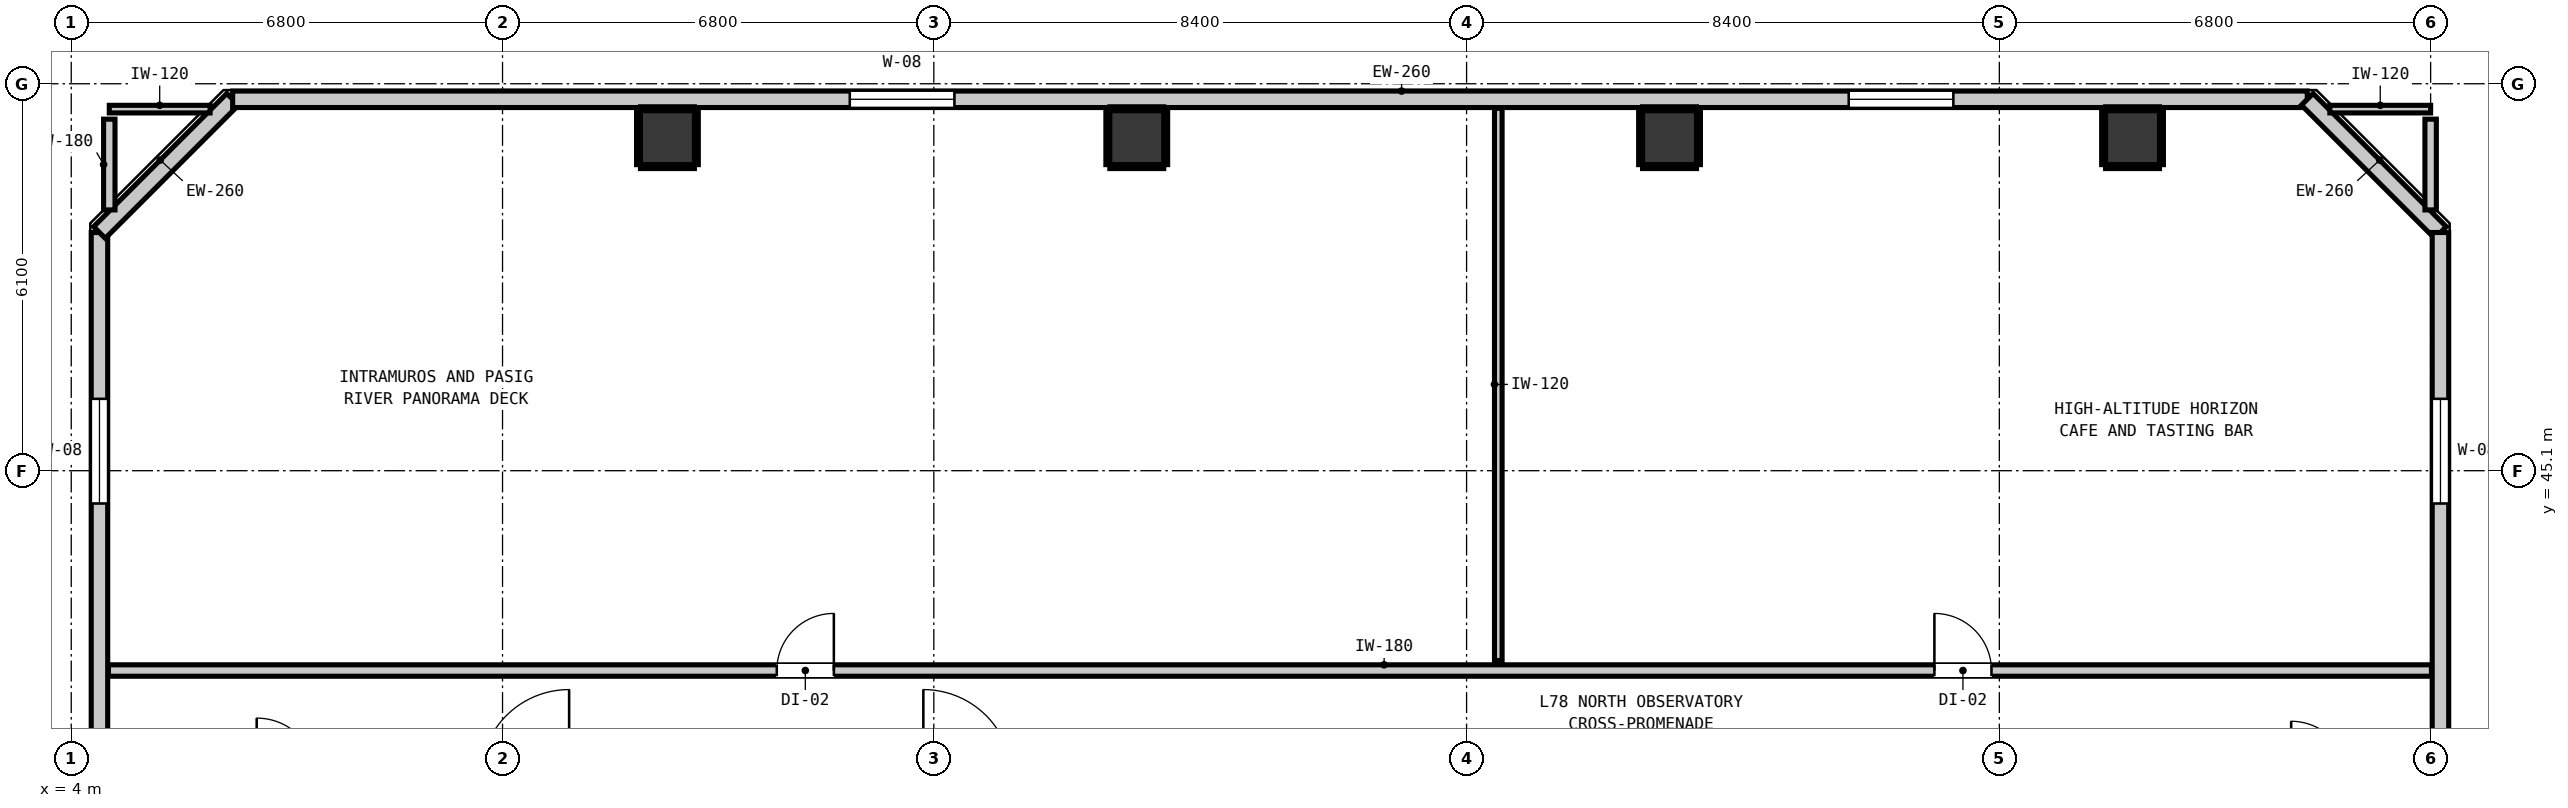
"""IFC4 building model, lengths in metres.
Left out: names, types, materials, properties, quantities, classifications, styles, units other than length and angle.
Written with IfcOpenShell. Run it as: python <this file> out.ifc"""

import sys

from ifc_helpers import new_model, si_unit, direction, frame, frame_2d, origin, origin_2d, place, context, subcontext, project, spatial, rectangle, extrude, element, fill, save


model = new_model("IFC4")
c1 = context("Model", 3, precision=1e-05, world=origin(), true_north=direction((0.0, 1.0)))
c2 = subcontext(c1, "Body", "Model", "MODEL_VIEW")
j1 = project(units=[si_unit("LENGTHUNIT", "METRE"), si_unit("PLANEANGLEUNIT", "RADIAN")], contexts=[c1])
p1 = place(None, origin())
s1 = spatial("IfcSite", under=j1, at=p1, CompositionType="ELEMENT")
p2 = place(p1, origin())
s2 = spatial("IfcBuilding", under=s1, at=p2, CompositionType="ELEMENT")
p3 = place(p2, frame((0.0, 0.0, 268.88)))
s3 = spatial("IfcBuildingStorey", under=s2, at=p3, CompositionType="ELEMENT", Elevation=268.88)
for number, where, z_axis, x_axis in (
    (1, (13.4, 50.35, 0.0), (0.0, 0.0, 1.0), (1.0, 0.0, 0.0)),
    (2, (20.8, 50.35, 0.0), (0.0, 0.0, 1.0), (1.0, 0.0, 0.0)),
    (3, (29.2, 50.35, 0.0), (0.0, 0.0, 1.0), (1.0, 0.0, 0.0)),
    (4, (36.5, 50.35, 0.0), (0.0, 0.0, 1.0), (1.0, 0.0, 0.0)),
):
    element("IfcColumn", number, at=place(p3, frame(where, z_axis=z_axis, x_axis=x_axis)), inside=s3, PredefinedType="COLUMN", context=c2, shape_type="SweptSolid", body=[
        extrude(rectangle(XDim=0.85, YDim=0.85, at=origin_2d()), origin(), (0.0, 0.0, 1.0), 4.6),
    ])
p4 = place(p3, frame((4.445, 18.545, 0.0), z_axis=(0.0, 0.0, 1.0), x_axis=(0.0, 1.0, 0.0)))
e5 = element("IfcWall", 5, at=p4, inside=s3, PredefinedType="STANDARD", context=c2, shape_type="SweptSolid", body=[
    extrude(rectangle(XDim=30.31, YDim=0.26, at=frame_2d((15.155, 0.0))), origin(), (0.0, 0.0, 1.0), 4.38),
])
p5 = place(p4, frame((26.038, 0.0, 0.85)))
e6 = element("IfcOpeningElement", 6, at=p5, cuts=e5, PredefinedType="OPENING", context=c2, shape_type="SweptSolid", body=[
    extrude(rectangle(XDim=1.65, YDim=1.75, at=frame_2d((0.825, 0.875))), frame((0.0, 0.14, 0.0), z_axis=(0.0, -1.0, 0.0), x_axis=(1.0, 0.0, 0.0)), (0.0, 0.0, 1.0), 0.28),
])
p6 = place(p3, frame((4.445, 48.855, 0.0), z_axis=(0.0, 0.0, 1.0), x_axis=(0.707065676302, 0.707147883682, 0.0)))
e7 = element("IfcWall", 7, at=p6, inside=s3, PredefinedType="STANDARD", context=c2, shape_type="SweptSolid", body=[
    extrude(rectangle(XDim=2.97, YDim=0.26, at=frame_2d((1.485, 0.0))), origin(), (0.0, 0.0, 1.0), 4.38),
])
p7 = place(p3, frame((6.545, 50.955, 0.0), z_axis=(0.0, 0.0, 1.0), x_axis=(1.0, 0.0, 0.0)))
e8 = element("IfcWall", 8, at=p7, inside=s3, PredefinedType="STANDARD", context=c2, shape_type="SweptSolid", body=[
    extrude(rectangle(XDim=32.71, YDim=0.26, at=frame_2d((16.355, 0.0))), origin(), (0.0, 0.0, 1.0), 4.38),
])
p8 = place(p7, frame((9.73, 0.0, 0.85)))
e9 = element("IfcOpeningElement", 9, at=p8, cuts=e8, PredefinedType="OPENING", context=c2, shape_type="SweptSolid", body=[
    extrude(rectangle(XDim=1.65, YDim=1.75, at=frame_2d((0.825, 0.875))), frame((0.0, 0.14, 0.0), z_axis=(0.0, -1.0, 0.0), x_axis=(1.0, 0.0, 0.0)), (0.0, 0.0, 1.0), 0.28),
])
p9 = place(p7, frame((25.48, 0.0, 0.85)))
e10 = element("IfcOpeningElement", 10, at=p9, cuts=e8, PredefinedType="OPENING", context=c2, shape_type="SweptSolid", body=[
    extrude(rectangle(XDim=1.65, YDim=1.75, at=frame_2d((0.825, 0.875))), frame((0.0, 0.14, 0.0), z_axis=(0.0, -1.0, 0.0), x_axis=(1.0, 0.0, 0.0)), (0.0, 0.0, 1.0), 0.28),
])
p10 = place(p3, frame((39.255, 50.955, 0.0), z_axis=(0.0, 0.0, 1.0), x_axis=(0.707106781187, -0.707106781187, 0.0)))
e11 = element("IfcWall", 11, at=p10, inside=s3, PredefinedType="STANDARD", context=c2, shape_type="SweptSolid", body=[
    extrude(rectangle(XDim=2.97, YDim=0.26, at=frame_2d((1.485, 0.0))), origin(), (0.0, 0.0, 1.0), 4.38),
])
p11 = place(p3, frame((41.355, 48.855, 0.0), z_axis=(0.0, 0.0, 1.0), x_axis=(0.0, -1.0, 0.0)))
e12 = element("IfcWall", 12, at=p11, inside=s3, PredefinedType="STANDARD", context=c2, shape_type="SweptSolid", body=[
    extrude(rectangle(XDim=30.31, YDim=0.26, at=frame_2d((15.155, 0.0))), origin(), (0.0, 0.0, 1.0), 4.38),
])
p12 = place(p11, frame((2.622, 0.0, 0.85)))
e13 = element("IfcOpeningElement", 13, at=p12, cuts=e12, PredefinedType="OPENING", context=c2, shape_type="SweptSolid", body=[
    extrude(rectangle(XDim=1.65, YDim=1.75, at=frame_2d((0.825, 0.875))), frame((0.0, 0.14, 0.0), z_axis=(0.0, -1.0, 0.0), x_axis=(1.0, 0.0, 0.0)), (0.0, 0.0, 1.0), 0.28),
])
p13 = place(p11, frame((22.103, 0.0, 0.85)))
e14 = element("IfcOpeningElement", 14, at=p13, cuts=e12, PredefinedType="OPENING", context=c2, shape_type="SweptSolid", body=[
    extrude(rectangle(XDim=1.65, YDim=1.75, at=frame_2d((0.825, 0.875))), frame((0.0, 0.14, 0.0), z_axis=(0.0, -1.0, 0.0), x_axis=(1.0, 0.0, 0.0)), (0.0, 0.0, 1.0), 0.28),
])
p14 = place(p11, frame((12.98, 0.0, 0.85)))
e15 = element("IfcOpeningElement", 15, at=p14, cuts=e12, PredefinedType="OPENING", context=c2, shape_type="SweptSolid", body=[
    extrude(rectangle(XDim=1.65, YDim=1.75, at=frame_2d((0.825, 0.875))), frame((0.0, 0.14, 0.0), z_axis=(0.0, -1.0, 0.0), x_axis=(1.0, 0.0, 0.0)), (0.0, 0.0, 1.0), 0.28),
])
p15 = place(p3, frame((4.587, 41.95, 0.0), z_axis=(0.0, 0.0, 1.0), x_axis=(1.0, 0.0, 0.0)))
e16 = element("IfcWall", 16, at=p15, inside=s3, PredefinedType="PARTITIONING", context=c2, shape_type="SweptSolid", body=[
    extrude(rectangle(XDim=36.626, YDim=0.18, at=frame_2d((18.313, 0.0))), origin(), (0.0, 0.0, 1.0), 4.38),
])
p16 = place(p15, frame((10.537, 0.0, 0.0)))
e17 = element("IfcOpeningElement", 17, at=p16, cuts=e16, PredefinedType="OPENING", context=c2, shape_type="SweptSolid", body=[
    extrude(rectangle(XDim=0.9, YDim=2.1, at=frame_2d((0.45, 1.05))), frame((0.0, 0.1, 0.0), z_axis=(0.0, -1.0, 0.0), x_axis=(1.0, 0.0, 0.0)), (0.0, 0.0, 1.0), 0.2),
])
p17 = place(p15, frame((28.789, 0.0, 0.0)))
e18 = element("IfcOpeningElement", 18, at=p17, cuts=e16, PredefinedType="OPENING", context=c2, shape_type="SweptSolid", body=[
    extrude(rectangle(XDim=0.9, YDim=2.1, at=frame_2d((0.45, 1.05))), frame((0.0, 0.1, 0.0), z_axis=(0.0, -1.0, 0.0), x_axis=(1.0, 0.0, 0.0)), (0.0, 0.0, 1.0), 0.2),
])
for number, where, z_axis, x_axis in (
    (19, (4.6, 50.8, 0.0), (0.0, 0.0, 1.0), (1.0, 0.0, 0.0)),
    (20, (39.611, 50.8, 0.0), (0.0, 0.0, 1.0), (1.0, 0.0, 0.0)),
):
    element("IfcWall", number, at=place(p3, frame(where, z_axis=z_axis, x_axis=x_axis)), inside=s3, PredefinedType="PARTITIONING", context=c2, shape_type="SweptSolid", body=[
        extrude(rectangle(XDim=1.589, YDim=0.12, at=frame_2d((0.794, 0.0))), origin(), (0.0, 0.0, 1.0), 4.38),
    ])
for number, where, z_axis, x_axis in (
    (21, (4.6, 49.211, 0.0), (0.0, 0.0, 1.0), (0.0, 1.0, 0.0)),
    (22, (41.2, 49.211, 0.0), (0.0, 0.0, 1.0), (0.0, 1.0, 0.0)),
):
    element("IfcWall", number, at=place(p3, frame(where, z_axis=z_axis, x_axis=x_axis)), inside=s3, PredefinedType="PARTITIONING", context=c2, shape_type="SweptSolid", body=[
        extrude(rectangle(XDim=1.431, YDim=0.18, at=frame_2d((0.716, 0.0))), origin(), (0.0, 0.0, 1.0), 4.38),
    ])
p18 = place(p3, frame((26.5, 42.108, 0.0), z_axis=(0.0, 0.0, 1.0), x_axis=(0.0, 1.0, 0.0)))
e23 = element("IfcWall", 23, at=p18, inside=s3, PredefinedType="PARTITIONING", context=c2, shape_type="SweptSolid", body=[
    extrude(rectangle(XDim=8.705, YDim=0.12, at=frame_2d((4.353, 0.0))), origin(), (0.0, 0.0, 1.0), 4.38),
])
for number, where, z_axis, x_axis in (
    (24, (12.975, 49.893, 0.0), (0.0, 0.0, 1.0), (1.0, 0.0, 0.0)),
    (25, (12.975, 50.807, 0.0), (0.0, 0.0, 1.0), (1.0, 0.0, 0.0)),
    (26, (12.943, 49.925, 0.0), (0.0, 0.0, 1.0), (0.0, 1.0, 0.0)),
    (27, (13.857, 49.925, 0.0), (0.0, 0.0, 1.0), (0.0, 1.0, 0.0)),
):
    element("IfcWall", number, at=place(p3, frame(where, z_axis=z_axis, x_axis=x_axis)), inside=s3, PredefinedType="PARTITIONING", context=c2, shape_type="SweptSolid", body=[
        extrude(rectangle(XDim=0.85, YDim=0.06, at=frame_2d((0.425, 0.0))), origin(), (0.0, 0.0, 1.0), 1.45),
    ])
for number, where, z_axis, x_axis in (
    (28, (20.375, 49.893, 0.0), (0.0, 0.0, 1.0), (1.0, 0.0, 0.0)),
    (29, (20.375, 50.807, 0.0), (0.0, 0.0, 1.0), (1.0, 0.0, 0.0)),
):
    element("IfcWall", number, at=place(p3, frame(where, z_axis=z_axis, x_axis=x_axis)), inside=s3, PredefinedType="PARTITIONING", context=c2, shape_type="SweptSolid", body=[
        extrude(rectangle(XDim=0.85, YDim=0.06, at=frame_2d((0.425, 0.0))), origin(), (0.0, 0.0, 1.0), 1.45),
    ])
for number, where, z_axis, x_axis in (
    (30, (20.343, 49.925, 0.0), (0.0, 0.0, 1.0), (0.0, 1.0, 0.0)),
    (31, (21.257, 49.925, 0.0), (0.0, 0.0, 1.0), (0.0, 1.0, 0.0)),
):
    element("IfcWall", number, at=place(p3, frame(where, z_axis=z_axis, x_axis=x_axis)), inside=s3, PredefinedType="PARTITIONING", context=c2, shape_type="SweptSolid", body=[
        extrude(rectangle(XDim=0.85, YDim=0.06, at=frame_2d((0.425, 0.0))), origin(), (0.0, 0.0, 1.0), 1.45),
    ])
for number, where, z_axis, x_axis in (
    (32, (28.775, 49.893, 0.0), (0.0, 0.0, 1.0), (1.0, 0.0, 0.0)),
    (33, (28.775, 50.807, 0.0), (0.0, 0.0, 1.0), (1.0, 0.0, 0.0)),
):
    element("IfcWall", number, at=place(p3, frame(where, z_axis=z_axis, x_axis=x_axis)), inside=s3, PredefinedType="PARTITIONING", context=c2, shape_type="SweptSolid", body=[
        extrude(rectangle(XDim=0.85, YDim=0.06, at=frame_2d((0.425, 0.0))), origin(), (0.0, 0.0, 1.0), 1.45),
    ])
for number, where, z_axis, x_axis in (
    (34, (28.743, 49.925, 0.0), (0.0, 0.0, 1.0), (0.0, 1.0, 0.0)),
    (35, (29.657, 49.925, 0.0), (0.0, 0.0, 1.0), (0.0, 1.0, 0.0)),
):
    element("IfcWall", number, at=place(p3, frame(where, z_axis=z_axis, x_axis=x_axis)), inside=s3, PredefinedType="PARTITIONING", context=c2, shape_type="SweptSolid", body=[
        extrude(rectangle(XDim=0.85, YDim=0.06, at=frame_2d((0.425, 0.0))), origin(), (0.0, 0.0, 1.0), 1.45),
    ])
for number, where, z_axis, x_axis in (
    (36, (36.075, 49.893, 0.0), (0.0, 0.0, 1.0), (1.0, 0.0, 0.0)),
    (37, (36.075, 50.807, 0.0), (0.0, 0.0, 1.0), (1.0, 0.0, 0.0)),
):
    element("IfcWall", number, at=place(p3, frame(where, z_axis=z_axis, x_axis=x_axis)), inside=s3, PredefinedType="PARTITIONING", context=c2, shape_type="SweptSolid", body=[
        extrude(rectangle(XDim=0.85, YDim=0.06, at=frame_2d((0.425, 0.0))), origin(), (0.0, 0.0, 1.0), 1.45),
    ])
for number, where, z_axis, x_axis in (
    (38, (36.043, 49.925, 0.0), (0.0, 0.0, 1.0), (0.0, 1.0, 0.0)),
    (39, (36.957, 49.925, 0.0), (0.0, 0.0, 1.0), (0.0, 1.0, 0.0)),
):
    element("IfcWall", number, at=place(p3, frame(where, z_axis=z_axis, x_axis=x_axis)), inside=s3, PredefinedType="PARTITIONING", context=c2, shape_type="SweptSolid", body=[
        extrude(rectangle(XDim=0.85, YDim=0.06, at=frame_2d((0.425, 0.0))), origin(), (0.0, 0.0, 1.0), 1.45),
    ])
p19 = place(p5, origin())
e40 = element("IfcWindow", 40, at=p19, inside=s3, PartitioningType="SINGLE_PANEL", PredefinedType="WINDOW", context=c2, shape_type="SweptSolid", body=[
    extrude(rectangle(XDim=1.65, YDim=1.75, at=frame_2d((0.825, 0.875))), frame((0.0, 0.03, 0.0), z_axis=(0.0, -1.0, 0.0), x_axis=(1.0, 0.0, 0.0)), (0.0, 0.0, 1.0), 0.06),
])
fill(e6, e40)
p20 = place(p8, origin())
e41 = element("IfcWindow", 41, at=p20, inside=s3, PartitioningType="SINGLE_PANEL", PredefinedType="WINDOW", context=c2, shape_type="SweptSolid", body=[
    extrude(rectangle(XDim=1.65, YDim=1.75, at=frame_2d((0.825, 0.875))), frame((0.0, 0.03, 0.0), z_axis=(0.0, -1.0, 0.0), x_axis=(1.0, 0.0, 0.0)), (0.0, 0.0, 1.0), 0.06),
])
fill(e9, e41)
p21 = place(p9, origin())
e42 = element("IfcWindow", 42, at=p21, inside=s3, PartitioningType="SINGLE_PANEL", PredefinedType="WINDOW", context=c2, shape_type="SweptSolid", body=[
    extrude(rectangle(XDim=1.65, YDim=1.75, at=frame_2d((0.825, 0.875))), frame((0.0, 0.03, 0.0), z_axis=(0.0, -1.0, 0.0), x_axis=(1.0, 0.0, 0.0)), (0.0, 0.0, 1.0), 0.06),
])
fill(e10, e42)
p22 = place(p12, origin())
e43 = element("IfcWindow", 43, at=p22, inside=s3, PartitioningType="SINGLE_PANEL", PredefinedType="WINDOW", context=c2, shape_type="SweptSolid", body=[
    extrude(rectangle(XDim=1.65, YDim=1.75, at=frame_2d((0.825, 0.875))), frame((0.0, 0.03, 0.0), z_axis=(0.0, -1.0, 0.0), x_axis=(1.0, 0.0, 0.0)), (0.0, 0.0, 1.0), 0.06),
])
fill(e13, e43)
p23 = place(p16, origin())
e44 = element("IfcDoor", 44, at=p23, inside=s3, OperationType="SINGLE_SWING_RIGHT", PredefinedType="DOOR", context=c2, shape_type="SweptSolid", body=[
    extrude(rectangle(XDim=0.9, YDim=2.1, at=frame_2d((0.45, 1.05))), frame((0.0, 0.025, 0.0), z_axis=(0.0, -1.0, 0.0), x_axis=(1.0, 0.0, 0.0)), (0.0, 0.0, 1.0), 0.05),
])
fill(e17, e44)
p24 = place(p17, origin())
e45 = element("IfcDoor", 45, at=p24, inside=s3, OperationType="SINGLE_SWING_LEFT", PredefinedType="DOOR", context=c2, shape_type="SweptSolid", body=[
    extrude(rectangle(XDim=0.9, YDim=2.1, at=frame_2d((0.45, 1.05))), frame((0.0, 0.025, 0.0), z_axis=(0.0, -1.0, 0.0), x_axis=(1.0, 0.0, 0.0)), (0.0, 0.0, 1.0), 0.05),
])
fill(e18, e45)
save(model, sys.argv[1])
